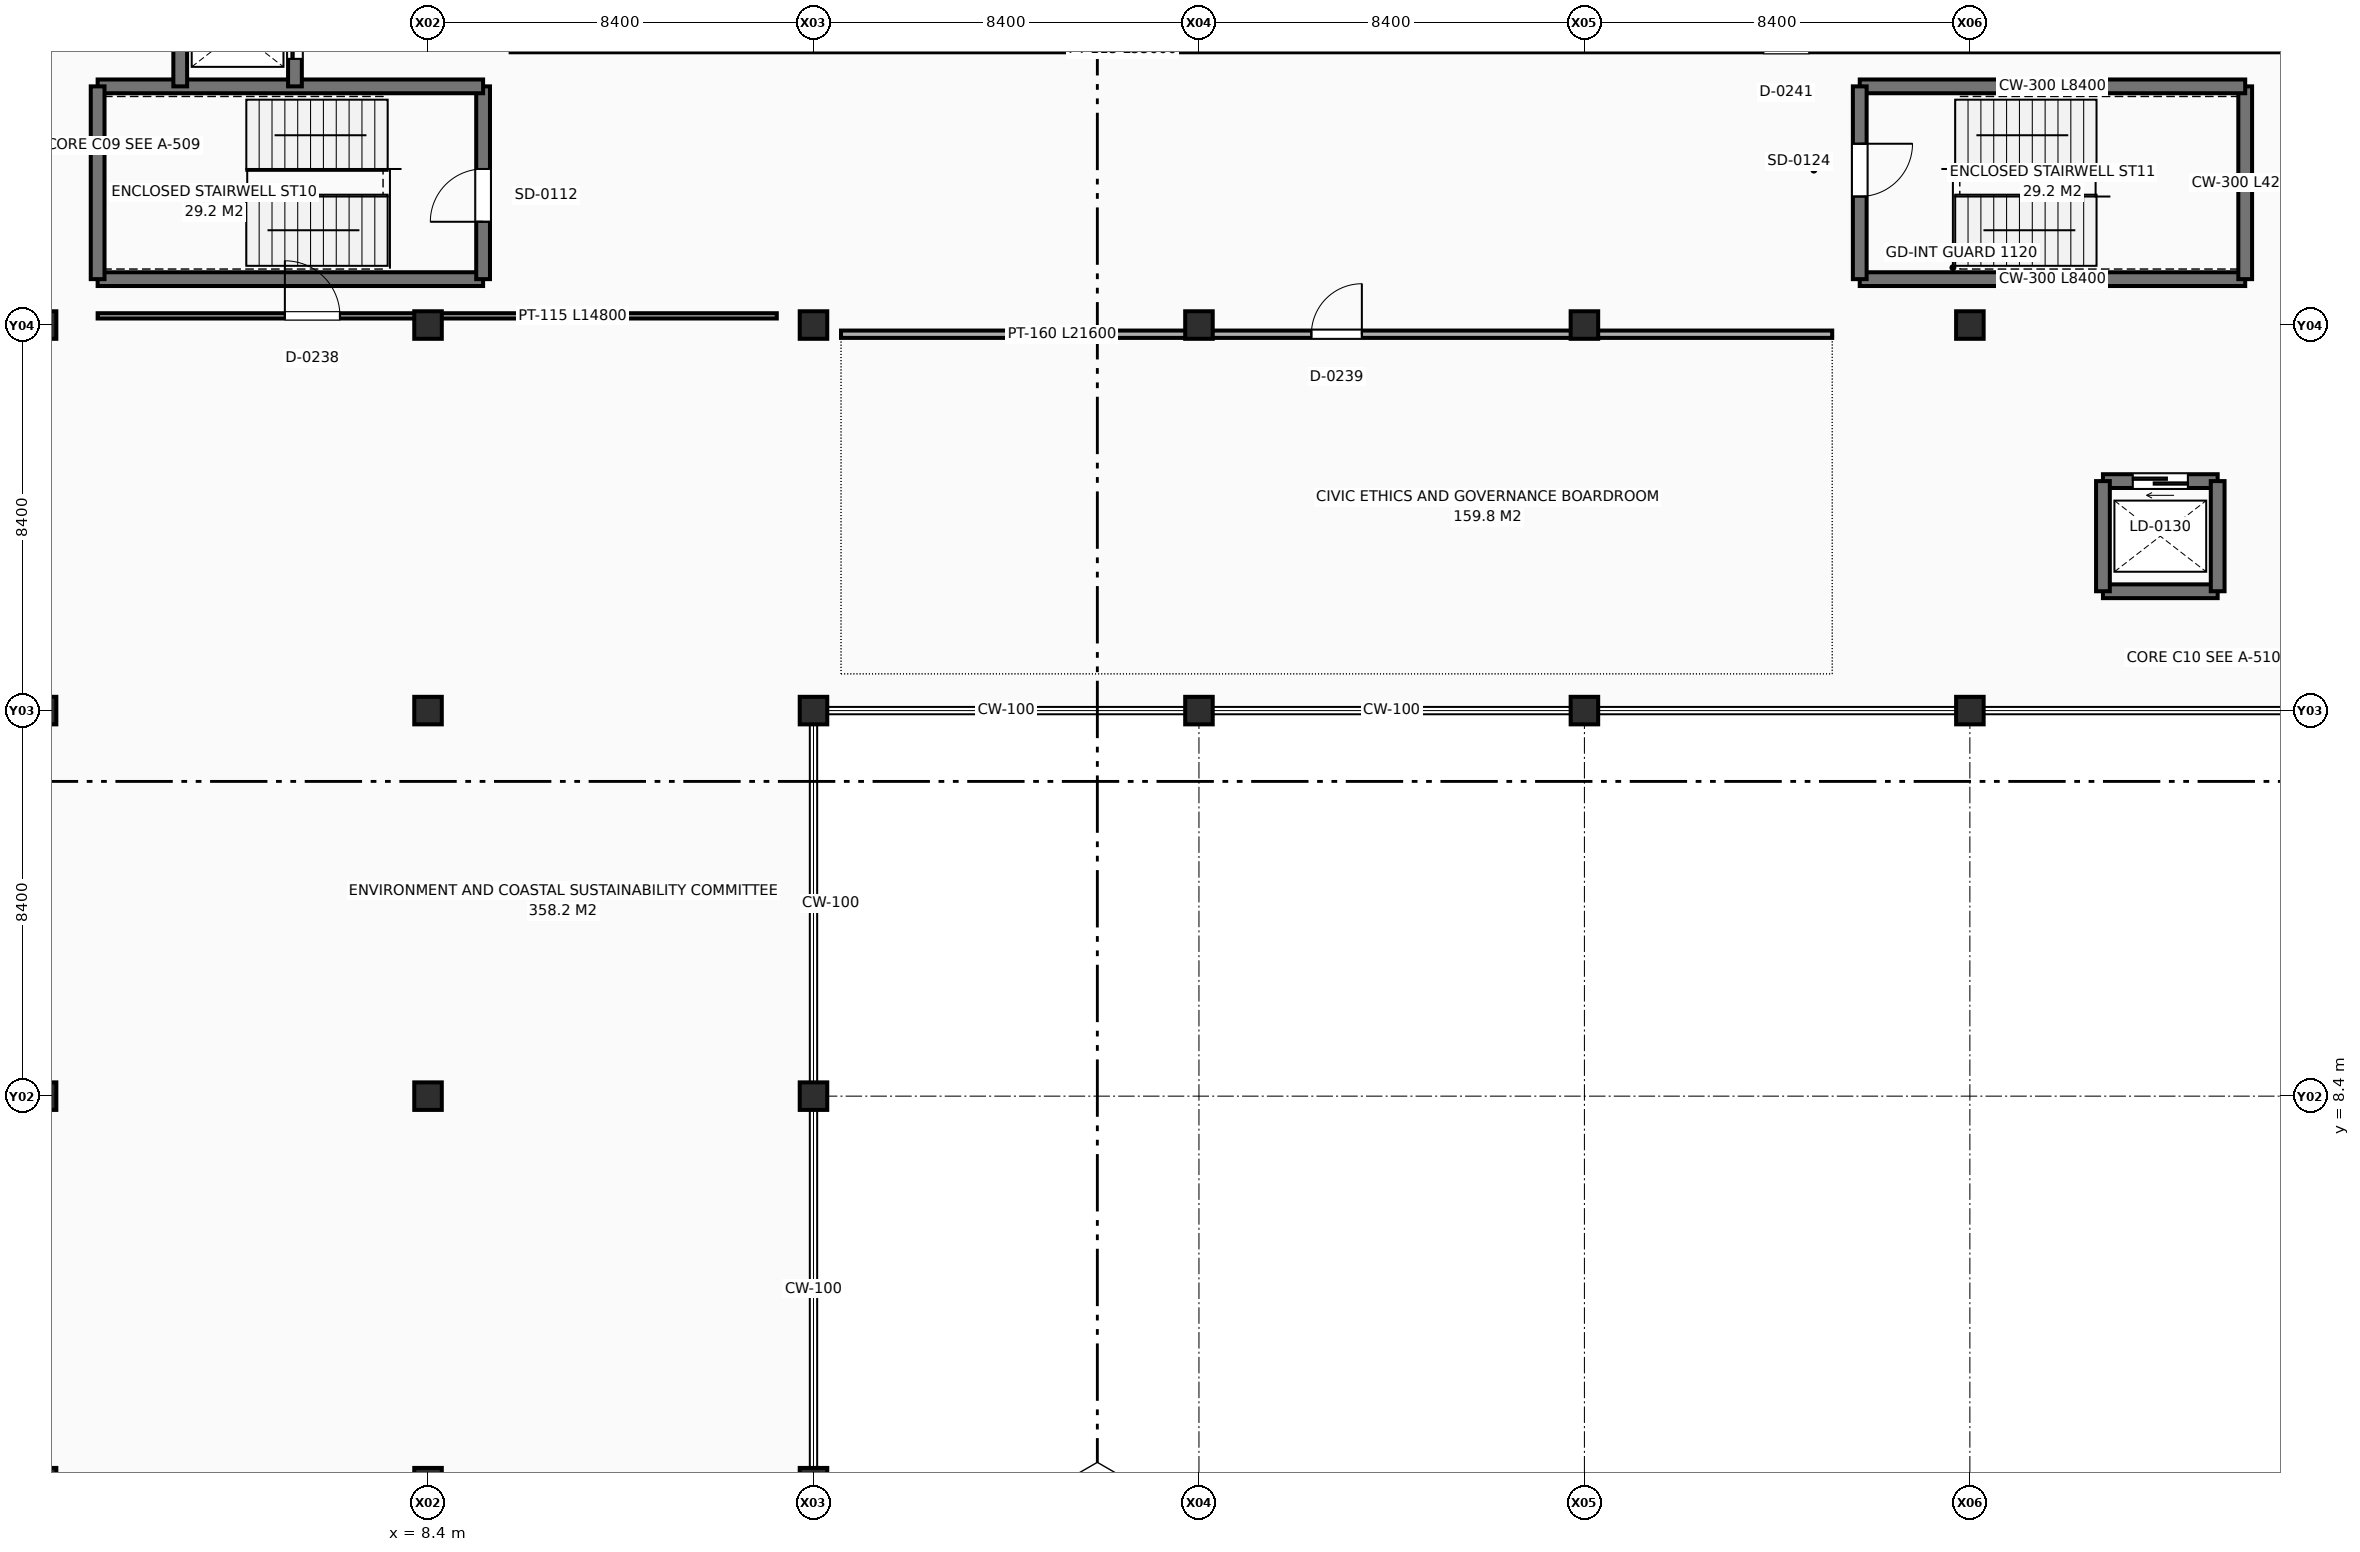
"""IFC4 building model, lengths in metres.
Left out: names, types, materials, properties, quantities, classifications, styles, units other than length and angle.
Written with IfcOpenShell. Run it as: python <this file> out.ifc"""

import sys

from ifc_helpers import new_model, si_unit, direction, frame, frame_2d, origin, origin_2d, place, context, subcontext, project, spatial, rectangle, extrude, element, fill, save


model = new_model("IFC4")
c1 = context("Model", 3, precision=1e-05, world=origin(), true_north=direction((0.0, 1.0)))
c2 = subcontext(c1, "Body", "Model", "MODEL_VIEW")
j1 = project(units=[si_unit("LENGTHUNIT", "METRE"), si_unit("PLANEANGLEUNIT", "RADIAN")], contexts=[c1])
p1 = place(None, origin())
s1 = spatial("IfcSite", under=j1, at=p1, CompositionType="ELEMENT")
p2 = place(p1, origin())
s2 = spatial("IfcBuilding", under=s1, at=p2, CompositionType="ELEMENT")
p3 = place(p2, frame((0.0, 0.0, 13.8)))
s3 = spatial("IfcBuildingStorey", under=s2, at=p3, CompositionType="ELEMENT", Elevation=13.8)
for number, where, z_axis, x_axis in (
    (1, (0.0, 0.0, 0.0), (0.0, 0.0, 1.0), (1.0, 0.0, 0.0)),
    (2, (0.0, 8.4, 0.0), (0.0, 0.0, 1.0), (1.0, 0.0, 0.0)),
    (3, (0.0, 16.8, 0.0), (0.0, 0.0, 1.0), (1.0, 0.0, 0.0)),
    (4, (0.0, 25.2, 0.0), (0.0, 0.0, 1.0), (1.0, 0.0, 0.0)),
    (5, (8.4, 0.0, 0.0), (0.0, 0.0, 1.0), (1.0, 0.0, 0.0)),
    (6, (8.4, 8.4, 0.0), (0.0, 0.0, 1.0), (1.0, 0.0, 0.0)),
    (7, (8.4, 16.8, 0.0), (0.0, 0.0, 1.0), (1.0, 0.0, 0.0)),
    (8, (8.4, 25.2, 0.0), (0.0, 0.0, 1.0), (1.0, 0.0, 0.0)),
    (9, (16.8, 0.0, 0.0), (0.0, 0.0, 1.0), (1.0, 0.0, 0.0)),
    (10, (16.8, 8.4, 0.0), (0.0, 0.0, 1.0), (1.0, 0.0, 0.0)),
    (11, (16.8, 16.8, 0.0), (0.0, 0.0, 1.0), (1.0, 0.0, 0.0)),
    (12, (16.8, 25.2, 0.0), (0.0, 0.0, 1.0), (1.0, 0.0, 0.0)),
    (13, (25.2, 16.8, 0.0), (0.0, 0.0, 1.0), (1.0, 0.0, 0.0)),
    (14, (25.2, 25.2, 0.0), (0.0, 0.0, 1.0), (1.0, 0.0, 0.0)),
    (15, (33.6, 16.8, 0.0), (0.0, 0.0, 1.0), (1.0, 0.0, 0.0)),
    (16, (33.6, 25.2, 0.0), (0.0, 0.0, 1.0), (1.0, 0.0, 0.0)),
    (17, (42.0, 16.8, 0.0), (0.0, 0.0, 1.0), (1.0, 0.0, 0.0)),
    (18, (42.0, 25.2, 0.0), (0.0, 0.0, 1.0), (1.0, 0.0, 0.0)),
):
    element("IfcColumn", number, at=place(p3, frame(where, z_axis=z_axis, x_axis=x_axis)), inside=s3, PredefinedType="COLUMN", context=c2, shape_type="SweptSolid", body=[
        extrude(rectangle(XDim=0.6, YDim=0.6, at=origin_2d()), origin(), (0.0, 0.0, 1.0), 4.2),
    ])
p4 = place(p3, frame((1.2, 26.2, 0.0), z_axis=(0.0, 0.0, 1.0), x_axis=(1.0, 0.0, 0.0)))
e19 = element("IfcWall", 19, at=p4, inside=s3, PredefinedType="SHEAR", context=c2, shape_type="SweptSolid", body=[
    extrude(rectangle(XDim=8.4, YDim=0.3, at=frame_2d((4.2, 0.0))), origin(), (0.0, 0.0, 1.0), 3.92),
])
p5 = place(p3, frame((9.6, 26.2, 0.0), z_axis=(0.0, 0.0, 1.0), x_axis=(0.0, 1.0, 0.0)))
e20 = element("IfcWall", 20, at=p5, inside=s3, PredefinedType="SHEAR", context=c2, shape_type="SweptSolid", body=[
    extrude(rectangle(XDim=4.2, YDim=0.3, at=frame_2d((2.1, 0.0))), origin(), (0.0, 0.0, 1.0), 3.92),
])
p6 = place(p5, frame((1.25, 0.0, 0.0)))
e21 = element("IfcOpeningElement", 21, at=p6, cuts=e20, PredefinedType="OPENING", context=c2, shape_type="SweptSolid", body=[
    extrude(rectangle(XDim=1.15, YDim=2.2, at=frame_2d((0.575, 1.1))), frame((0.0, 0.16, 0.0), z_axis=(0.0, -1.0, 0.0), x_axis=(1.0, 0.0, 0.0)), (0.0, 0.0, 1.0), 0.32),
])
p7 = place(p3, frame((9.6, 30.4, 0.0), z_axis=(0.0, 0.0, 1.0), x_axis=(-1.0, 0.0, 0.0)))
e22 = element("IfcWall", 22, at=p7, inside=s3, PredefinedType="SHEAR", context=c2, shape_type="SweptSolid", body=[
    extrude(rectangle(XDim=8.4, YDim=0.3, at=frame_2d((4.2, 0.0))), origin(), (0.0, 0.0, 1.0), 3.92),
])
p8 = place(p3, frame((1.2, 30.4, 0.0), z_axis=(0.0, 0.0, 1.0), x_axis=(0.0, -1.0, 0.0)))
e23 = element("IfcWall", 23, at=p8, inside=s3, PredefinedType="SHEAR", context=c2, shape_type="SweptSolid", body=[
    extrude(rectangle(XDim=4.2, YDim=0.3, at=frame_2d((2.1, 0.0))), origin(), (0.0, 0.0, 1.0), 3.92),
])
p9 = place(p3, frame((3.0, 32.8, 0.0), z_axis=(0.0, 0.0, 1.0), x_axis=(0.0, -1.0, 0.0)))
e24 = element("IfcWall", 24, at=p9, inside=s3, PredefinedType="SHEAR", context=c2, shape_type="SweptSolid", body=[
    extrude(rectangle(XDim=2.4, YDim=0.3, at=frame_2d((1.2, 0.0))), origin(), (0.0, 0.0, 1.0), 3.92),
])
p10 = place(p3, frame((5.5, 30.4, 0.0), z_axis=(0.0, 0.0, 1.0), x_axis=(0.0, 1.0, 0.0)))
e25 = element("IfcWall", 25, at=p10, inside=s3, PredefinedType="SHEAR", context=c2, shape_type="SweptSolid", body=[
    extrude(rectangle(XDim=2.4, YDim=0.3, at=frame_2d((1.2, 0.0))), origin(), (0.0, 0.0, 1.0), 3.92),
])
p11 = place(p10, frame((0.6, 0.0, 0.0)))
e26 = element("IfcOpeningElement", 26, at=p11, cuts=e25, PredefinedType="OPENING", context=c2, shape_type="SweptSolid", body=[
    extrude(rectangle(XDim=1.2, YDim=2.25, at=frame_2d((0.6, 1.125))), frame((0.0, 0.16, 0.0), z_axis=(0.0, -1.0, 0.0), x_axis=(1.0, 0.0, 0.0)), (0.0, 0.0, 1.0), 0.32),
])
p12 = place(p3, frame((39.6, 26.2, 0.0), z_axis=(0.0, 0.0, 1.0), x_axis=(1.0, 0.0, 0.0)))
e27 = element("IfcWall", 27, at=p12, inside=s3, PredefinedType="SHEAR", context=c2, shape_type="SweptSolid", body=[
    extrude(rectangle(XDim=8.4, YDim=0.3, at=frame_2d((4.2, 0.0))), origin(), (0.0, 0.0, 1.0), 3.92),
])
p13 = place(p3, frame((48.0, 26.2, 0.0), z_axis=(0.0, 0.0, 1.0), x_axis=(0.0, 1.0, 0.0)))
e28 = element("IfcWall", 28, at=p13, inside=s3, PredefinedType="SHEAR", context=c2, shape_type="SweptSolid", body=[
    extrude(rectangle(XDim=4.2, YDim=0.3, at=frame_2d((2.1, 0.0))), origin(), (0.0, 0.0, 1.0), 3.92),
])
p14 = place(p3, frame((48.0, 30.4, 0.0), z_axis=(0.0, 0.0, 1.0), x_axis=(-1.0, 0.0, 0.0)))
e29 = element("IfcWall", 29, at=p14, inside=s3, PredefinedType="SHEAR", context=c2, shape_type="SweptSolid", body=[
    extrude(rectangle(XDim=8.4, YDim=0.3, at=frame_2d((4.2, 0.0))), origin(), (0.0, 0.0, 1.0), 3.92),
])
p15 = place(p3, frame((39.6, 30.4, 0.0), z_axis=(0.0, 0.0, 1.0), x_axis=(0.0, -1.0, 0.0)))
e30 = element("IfcWall", 30, at=p15, inside=s3, PredefinedType="SHEAR", context=c2, shape_type="SweptSolid", body=[
    extrude(rectangle(XDim=4.2, YDim=0.3, at=frame_2d((2.1, 0.0))), origin(), (0.0, 0.0, 1.0), 3.92),
])
p16 = place(p15, frame((1.25, 0.0, 0.0)))
e31 = element("IfcOpeningElement", 31, at=p16, cuts=e30, PredefinedType="OPENING", context=c2, shape_type="SweptSolid", body=[
    extrude(rectangle(XDim=1.15, YDim=2.2, at=frame_2d((0.575, 1.1))), frame((0.0, 0.16, 0.0), z_axis=(0.0, -1.0, 0.0), x_axis=(1.0, 0.0, 0.0)), (0.0, 0.0, 1.0), 0.32),
])
p17 = place(p3, frame((47.4, 21.8, 0.0), z_axis=(0.0, 0.0, 1.0), x_axis=(-1.0, 0.0, 0.0)))
e32 = element("IfcWall", 32, at=p17, inside=s3, PredefinedType="SHEAR", context=c2, shape_type="SweptSolid", body=[
    extrude(rectangle(XDim=2.5, YDim=0.3, at=frame_2d((1.25, 0.0))), origin(), (0.0, 0.0, 1.0), 3.92),
])
p18 = place(p17, frame((0.65, 0.0, 0.0)))
e33 = element("IfcOpeningElement", 33, at=p18, cuts=e32, PredefinedType="OPENING", context=c2, shape_type="SweptSolid", body=[
    extrude(rectangle(XDim=1.2, YDim=2.25, at=frame_2d((0.6, 1.125))), frame((0.0, 0.16, 0.0), z_axis=(0.0, -1.0, 0.0), x_axis=(1.0, 0.0, 0.0)), (0.0, 0.0, 1.0), 0.32),
])
p19 = place(p3, frame((44.9, 19.4, 0.0), z_axis=(0.0, 0.0, 1.0), x_axis=(1.0, 0.0, 0.0)))
e34 = element("IfcWall", 34, at=p19, inside=s3, PredefinedType="SHEAR", context=c2, shape_type="SweptSolid", body=[
    extrude(rectangle(XDim=2.5, YDim=0.3, at=frame_2d((1.25, 0.0))), origin(), (0.0, 0.0, 1.0), 3.92),
])
for number, where, z_axis, x_axis in (
    (35, (44.9, 21.8, 0.0), (0.0, 0.0, 1.0), (0.0, -1.0, 0.0)),
    (36, (47.4, 19.4, 0.0), (0.0, 0.0, 1.0), (0.0, 1.0, 0.0)),
):
    element("IfcWall", number, at=place(p3, frame(where, z_axis=z_axis, x_axis=x_axis)), inside=s3, PredefinedType="SHEAR", context=c2, shape_type="SweptSolid", body=[
        extrude(rectangle(XDim=2.4, YDim=0.3, at=frame_2d((1.2, 0.0))), origin(), (0.0, 0.0, 1.0), 3.92),
    ])
p20 = place(p3, frame((1.2, 25.4, 0.0), z_axis=(0.0, 0.0, 1.0), x_axis=(1.0, 0.0, 0.0)))
e37 = element("IfcWall", 37, at=p20, inside=s3, PredefinedType="PARTITIONING", context=c2, shape_type="SweptSolid", body=[
    extrude(rectangle(XDim=14.8, YDim=0.115, at=frame_2d((7.4, 0.0))), origin(), (0.0, 0.0, 1.0), 3.29),
])
p21 = place(p20, frame((4.08, 0.0, 0.0)))
e38 = element("IfcOpeningElement", 38, at=p21, cuts=e37, PredefinedType="OPENING", context=c2, shape_type="SweptSolid", body=[
    extrude(rectangle(XDim=1.2, YDim=2.2, at=frame_2d((0.6, 1.1))), frame((0.0, 0.067, 0.0), z_axis=(0.0, -1.0, 0.0), x_axis=(1.0, 0.0, 0.0)), (0.0, 0.0, 1.0), 0.135),
])
p22 = place(p3, frame((17.4, 25.0, 0.0), z_axis=(0.0, 0.0, 1.0), x_axis=(1.0, 0.0, 0.0)))
e39 = element("IfcWall", 39, at=p22, inside=s3, PredefinedType="PARTITIONING", context=c2, shape_type="SweptSolid", body=[
    extrude(rectangle(XDim=21.6, YDim=0.16, at=frame_2d((10.8, 0.0))), origin(), (0.0, 0.0, 1.0), 3.29),
])
p23 = place(p22, frame((10.25, 0.0, 0.0)))
e40 = element("IfcOpeningElement", 40, at=p23, cuts=e39, PredefinedType="OPENING", context=c2, shape_type="SweptSolid", body=[
    extrude(rectangle(XDim=1.1, YDim=2.15, at=frame_2d((0.55, 1.075))), frame((0.0, 0.09, 0.0), z_axis=(0.0, -1.0, 0.0), x_axis=(1.0, 0.0, 0.0)), (0.0, 0.0, 1.0), 0.18),
])
p24 = place(p3, frame((10.2, 31.2, 0.0), z_axis=(0.0, 0.0, 1.0), x_axis=(1.0, 0.0, 0.0)))
e41 = element("IfcWall", 41, at=p24, inside=s3, PredefinedType="PARTITIONING", context=c2, shape_type="SweptSolid", body=[
    extrude(rectangle(XDim=55.6, YDim=0.115, at=frame_2d((27.8, 0.0))), origin(), (0.0, 0.0, 1.0), 3.86),
])
p25 = place(p24, frame((27.3, 0.0, 0.0)))
e42 = element("IfcOpeningElement", 42, at=p25, cuts=e41, PredefinedType="OPENING", context=c2, shape_type="SweptSolid", body=[
    extrude(rectangle(XDim=1.0, YDim=2.1, at=frame_2d((0.5, 1.05))), frame((0.0, 0.067, 0.0), z_axis=(0.0, -1.0, 0.0), x_axis=(1.0, 0.0, 0.0)), (0.0, 0.0, 1.0), 0.135),
])
p26 = place(p6, origin())
e43 = element("IfcDoor", 43, at=p26, inside=s3, OperationType="SINGLE_SWING_LEFT", PredefinedType="DOOR", context=c2, shape_type="SweptSolid", body=[
    extrude(rectangle(XDim=1.15, YDim=2.2, at=frame_2d((0.575, 1.1))), frame((0.0, 0.025, 0.0), z_axis=(0.0, -1.0, 0.0), x_axis=(1.0, 0.0, 0.0)), (0.0, 0.0, 1.0), 0.05),
])
fill(e21, e43)
p27 = place(p11, origin())
e44 = element("IfcDoor", 44, at=p27, inside=s3, OperationType="SLIDING_TO_LEFT", PredefinedType="DOOR", context=c2, shape_type="SweptSolid", body=[
    extrude(rectangle(XDim=1.2, YDim=2.25, at=frame_2d((0.6, 1.125))), frame((0.0, 0.025, 0.0), z_axis=(0.0, -1.0, 0.0), x_axis=(1.0, 0.0, 0.0)), (0.0, 0.0, 1.0), 0.05),
])
fill(e26, e44)
p28 = place(p16, origin())
e45 = element("IfcDoor", 45, at=p28, inside=s3, OperationType="SINGLE_SWING_LEFT", PredefinedType="DOOR", context=c2, shape_type="SweptSolid", body=[
    extrude(rectangle(XDim=1.15, YDim=2.2, at=frame_2d((0.575, 1.1))), frame((0.0, 0.025, 0.0), z_axis=(0.0, -1.0, 0.0), x_axis=(1.0, 0.0, 0.0)), (0.0, 0.0, 1.0), 0.05),
])
fill(e31, e45)
p29 = place(p18, origin())
e46 = element("IfcDoor", 46, at=p29, inside=s3, OperationType="SLIDING_TO_LEFT", PredefinedType="DOOR", context=c2, shape_type="SweptSolid", body=[
    extrude(rectangle(XDim=1.2, YDim=2.25, at=frame_2d((0.6, 1.125))), frame((0.0, 0.025, 0.0), z_axis=(0.0, -1.0, 0.0), x_axis=(1.0, 0.0, 0.0)), (0.0, 0.0, 1.0), 0.05),
])
fill(e33, e46)
p30 = place(p21, origin())
e47 = element("IfcDoor", 47, at=p30, inside=s3, OperationType="SINGLE_SWING_LEFT", PredefinedType="DOOR", context=c2, shape_type="SweptSolid", body=[
    extrude(rectangle(XDim=1.2, YDim=2.2, at=frame_2d((0.6, 1.1))), frame((0.0, 0.025, 0.0), z_axis=(0.0, -1.0, 0.0), x_axis=(1.0, 0.0, 0.0)), (0.0, 0.0, 1.0), 0.05),
])
fill(e38, e47)
p31 = place(p23, origin())
e48 = element("IfcDoor", 48, at=p31, inside=s3, OperationType="SINGLE_SWING_RIGHT", PredefinedType="DOOR", context=c2, shape_type="SweptSolid", body=[
    extrude(rectangle(XDim=1.1, YDim=2.15, at=frame_2d((0.55, 1.075))), frame((0.0, 0.025, 0.0), z_axis=(0.0, -1.0, 0.0), x_axis=(1.0, 0.0, 0.0)), (0.0, 0.0, 1.0), 0.05),
])
fill(e40, e48)
save(model, sys.argv[1])
